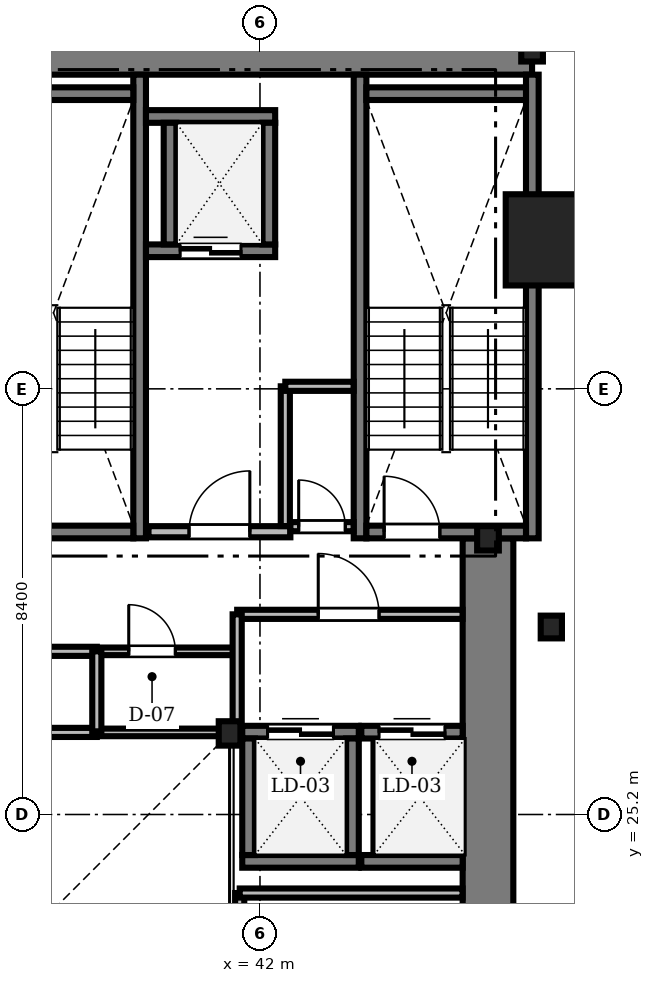
"""IFC4 building model, lengths in metres.
Left out: names, types, materials, properties, quantities, classifications, styles, units other than length and angle.
Written with IfcOpenShell. Run it as: python <this file> out.ifc"""

import sys

from ifc_helpers import new_model, si_unit, direction, frame, frame_2d, origin, origin_2d, place, context, subcontext, project, spatial, rectangle, i_section, extrude, source, transform, mapped, element, fill, save


model = new_model("IFC4")
c1 = context("Model", 3, precision=1e-05, world=origin(), true_north=direction((0.0, 1.0)))
c2 = subcontext(c1, "Body", "Model", "MODEL_VIEW")
j1 = project(units=[si_unit("LENGTHUNIT", "METRE"), si_unit("PLANEANGLEUNIT", "RADIAN")], contexts=[c1])
p1 = place(None, origin())
s1 = spatial("IfcSite", under=j1, at=p1, CompositionType="ELEMENT")
p2 = place(p1, origin())
s2 = spatial("IfcBuilding", under=s1, at=p2, CompositionType="ELEMENT")
p3 = place(p2, frame((0.0, 0.0, 60.45)))
s3 = spatial("IfcBuildingStorey", under=s2, at=p3, CompositionType="ELEMENT", Elevation=60.45)
m1 = source(origin(), c2, "Body", "SweptSolid", [
    extrude(rectangle(XDim=17.52, YDim=1.0, at=frame_2d((8.76, 0.0))), origin(), (0.0, 0.0, 1.0), 3.41),
])
p4 = place(p3, frame((29.85, 40.3, 0.0), z_axis=(0.0, 0.0, 1.0), x_axis=(1.0, 0.0, 0.0)))
e1 = element("IfcWall", 1, at=p4, inside=s3, PredefinedType="SHEAR", context=c2, shape_type="MappedRepresentation", body=[
    mapped(m1, transform((0.0, 0.0, 0.0), scale=1.0)),
])
m2 = source(origin(), c2, "Body", "SweptSolid", [
    extrude(rectangle(XDim=13.15, YDim=1.0, at=frame_2d((6.575, 0.0))), origin(), (0.0, 0.0, 1.0), 3.41),
])
p5 = place(p3, frame((46.5, 17.5, 0.0), z_axis=(0.0, 0.0, 1.0), x_axis=(0.0, 1.0, 0.0)))
e2 = element("IfcWall", 2, at=p5, inside=s3, PredefinedType="SHEAR", context=c2, shape_type="MappedRepresentation", body=[
    mapped(m2, transform((0.0, 0.0, 0.0), scale=1.0)),
])
m3 = source(origin(), c2, "Body", "SweptSolid", [
    extrude(i_section(OverallWidth=0.428, OverallDepth=0.481, WebThickness=0.04, FlangeThickness=0.063, FilletRadius=0.015, at=origin_2d()), origin(), (0.0, 0.0, 1.0), 3.41),
])
for number, where, z_axis, x_axis in (
    (3, (41.4, 26.8, 0.0), (0.0, 0.0, 1.0), (1.0, 0.0, 0.0)),
    (4, (46.5, 30.65, 0.0), (0.0, 0.0, 1.0), (1.0, 0.0, 0.0)),
    (5, (47.37, 40.3, 0.0), (0.0, 0.0, 1.0), (1.0, 0.0, 0.0)),
):
    element("IfcColumn", number, at=place(p3, frame(where, z_axis=z_axis, x_axis=x_axis)), inside=s3, PredefinedType="COLUMN", context=c2, shape_type="MappedRepresentation", body=[
        mapped(m3, transform((0.0, 0.0, 0.0), scale=1.0)),
    ])
m4 = source(origin(), c2, "Body", "SweptSolid", [
    extrude(rectangle(XDim=1.8, YDim=1.8, at=origin_2d()), origin(), (0.0, 0.0, 1.0), 3.41),
])
p6 = place(p3, frame((47.75, 36.54, 0.0), z_axis=(0.0, 0.0, 1.0), x_axis=(1.0, 0.0, 0.0)))
e6 = element("IfcColumn", 6, at=p6, inside=s3, PredefinedType="COLUMN", context=c2, shape_type="MappedRepresentation", body=[
    mapped(m4, transform((0.0, 0.0, 0.0), scale=1.0)),
])
m5 = source(origin(), c2, "Body", "SweptSolid", [
    extrude(i_section(OverallWidth=0.419, OverallDepth=0.449, WebThickness=0.031, FlangeThickness=0.048, FilletRadius=0.015, at=origin_2d()), origin(), (0.0, 0.0, 1.0), 3.41),
])
p7 = place(p3, frame((47.75, 28.9, 0.0), z_axis=(0.0, 0.0, 1.0), x_axis=(1.0, 0.0, 0.0)))
e7 = element("IfcColumn", 7, at=p7, inside=s3, PredefinedType="COLUMN", context=c2, shape_type="MappedRepresentation", body=[
    mapped(m5, transform((0.0, 0.0, 0.0), scale=1.0)),
])
m6 = source(origin(), c2, "Body", "SweptSolid", [
    extrude(rectangle(XDim=9.15, YDim=0.25, at=frame_2d((4.575, 0.0))), origin(), (0.0, 0.0, 1.0), 3.45),
])
p8 = place(p3, frame((39.625, 30.65, 0.0), z_axis=(0.0, 0.0, 1.0), x_axis=(0.0, 1.0, 0.0)))
e8 = element("IfcWall", 8, at=p8, inside=s3, PredefinedType="SOLIDWALL", context=c2, shape_type="MappedRepresentation", body=[
    mapped(m6, transform((0.0, 0.0, 0.0), scale=1.0)),
])
m7 = source(origin(), c2, "Body", "SweptSolid", [
    extrude(rectangle(XDim=3.15, YDim=0.25, at=frame_2d((1.575, 0.0))), origin(), (0.0, 0.0, 1.0), 3.45),
])
p9 = place(p3, frame((36.35, 39.425, 0.0), z_axis=(0.0, 0.0, 1.0), x_axis=(1.0, 0.0, 0.0)))
e9 = element("IfcWall", 9, at=p9, inside=s3, PredefinedType="SOLIDWALL", context=c2, shape_type="MappedRepresentation", body=[
    mapped(m7, transform((0.0, 0.0, 0.0), scale=1.0)),
])
p10 = place(p3, frame((36.35, 30.775, 0.0), z_axis=(0.0, 0.0, 1.0), x_axis=(1.0, 0.0, 0.0)))
e10 = element("IfcWall", 10, at=p10, inside=s3, PredefinedType="SOLIDWALL", context=c2, shape_type="MappedRepresentation", body=[
    mapped(m7, transform((0.0, 0.0, 0.0), scale=1.0)),
])
m8 = source(origin(), c2, "Body", "SweptSolid", [
    extrude(rectangle(XDim=1.1, YDim=2.2, at=frame_2d((0.55, 1.1))), frame((0.0, 0.135, 0.0), z_axis=(0.0, -1.0, 0.0), x_axis=(1.0, 0.0, 0.0)), (0.0, 0.0, 1.0), 0.27),
])
p11 = place(p10, frame((0.35, 0.0, 0.0)))
e11 = element("IfcOpeningElement", 11, at=p11, cuts=e10, PredefinedType="OPENING", context=c2, shape_type="MappedRepresentation", body=[
    mapped(m8, transform((0.0, 0.0, 0.0), scale=1.0)),
])
for number, where, z_axis, x_axis in (
    (12, (43.975, 30.65, 0.0), (0.0, 0.0, 1.0), (0.0, 1.0, 0.0)),
    (13, (47.375, 30.65, 0.0), (0.0, 0.0, 1.0), (0.0, 1.0, 0.0)),
):
    element("IfcWall", number, at=place(p3, frame(where, z_axis=z_axis, x_axis=x_axis)), inside=s3, PredefinedType="SOLIDWALL", context=c2, shape_type="MappedRepresentation", body=[
        mapped(m6, transform((0.0, 0.0, 0.0), scale=1.0)),
    ])
p12 = place(p3, frame((44.1, 39.425, 0.0), z_axis=(0.0, 0.0, 1.0), x_axis=(1.0, 0.0, 0.0)))
e14 = element("IfcWall", 14, at=p12, inside=s3, PredefinedType="SOLIDWALL", context=c2, shape_type="MappedRepresentation", body=[
    mapped(m7, transform((0.0, 0.0, 0.0), scale=1.0)),
])
p13 = place(p3, frame((44.1, 30.775, 0.0), z_axis=(0.0, 0.0, 1.0), x_axis=(1.0, 0.0, 0.0)))
e15 = element("IfcWall", 15, at=p13, inside=s3, PredefinedType="SOLIDWALL", context=c2, shape_type="MappedRepresentation", body=[
    mapped(m7, transform((0.0, 0.0, 0.0), scale=1.0)),
])
p14 = place(p13, frame((0.35, 0.0, 0.0)))
e16 = element("IfcOpeningElement", 16, at=p14, cuts=e15, PredefinedType="OPENING", context=c2, shape_type="MappedRepresentation", body=[
    mapped(m8, transform((0.0, 0.0, 0.0), scale=1.0)),
])
m9 = source(origin(), c2, "Body", "SweptSolid", [
    extrude(rectangle(XDim=2.8, YDim=0.22, at=frame_2d((1.4, 0.0))), origin(), (0.0, 0.0, 1.0), 3.41),
])
p15 = place(p3, frame((39.8, 30.78, 0.0), z_axis=(0.0, 0.0, 1.0), x_axis=(1.0, 0.0, 0.0)))
e17 = element("IfcWall", 17, at=p15, inside=s3, PredefinedType="SOLIDWALL", context=c2, shape_type="MappedRepresentation", body=[
    mapped(m9, transform((0.0, 0.0, 0.0), scale=1.0)),
])
m10 = source(origin(), c2, "Body", "SweptSolid", [
    extrude(rectangle(XDim=1.2, YDim=2.2, at=frame_2d((0.6, 1.1))), frame((0.0, 0.12, 0.0), z_axis=(0.0, -1.0, 0.0), x_axis=(1.0, 0.0, 0.0)), (0.0, 0.0, 1.0), 0.24),
])
p16 = place(p15, frame((0.8, 0.0, 0.0)))
e18 = element("IfcOpeningElement", 18, at=p16, cuts=e17, PredefinedType="OPENING", context=c2, shape_type="MappedRepresentation", body=[
    mapped(m10, transform((0.0, 0.0, 0.0), scale=1.0)),
])
m11 = source(origin(), c2, "Body", "SweptSolid", [
    extrude(rectangle(XDim=2.55, YDim=0.25, at=frame_2d((1.275, 0.0))), origin(), (0.0, 0.0, 1.0), 3.41),
])
p17 = place(p3, frame((39.75, 36.325, 0.0), z_axis=(0.0, 0.0, 1.0), x_axis=(1.0, 0.0, 0.0)))
e19 = element("IfcWall", 19, at=p17, inside=s3, PredefinedType="SOLIDWALL", context=c2, shape_type="MappedRepresentation", body=[
    mapped(m11, transform((0.0, 0.0, 0.0), scale=1.0)),
])
m12 = source(origin(), c2, "Body", "SweptSolid", [
    extrude(rectangle(XDim=1.2, YDim=2.25, at=frame_2d((0.6, 1.125))), frame((0.0, 0.135, 0.0), z_axis=(0.0, -1.0, 0.0), x_axis=(1.0, 0.0, 0.0)), (0.0, 0.0, 1.0), 0.27),
])
p18 = place(p17, frame((0.675, 0.0, 0.0)))
e20 = element("IfcOpeningElement", 20, at=p18, cuts=e19, PredefinedType="OPENING", context=c2, shape_type="MappedRepresentation", body=[
    mapped(m12, transform((0.0, 0.0, 0.0), scale=1.0)),
])
p19 = place(p3, frame((39.75, 38.975, 0.0), z_axis=(0.0, 0.0, 1.0), x_axis=(1.0, 0.0, 0.0)))
e21 = element("IfcWall", 21, at=p19, inside=s3, PredefinedType="SOLIDWALL", context=c2, shape_type="MappedRepresentation", body=[
    mapped(m11, transform((0.0, 0.0, 0.0), scale=1.0)),
])
m13 = source(origin(), c2, "Body", "SweptSolid", [
    extrude(rectangle(XDim=2.4, YDim=0.25, at=frame_2d((1.2, 0.0))), origin(), (0.0, 0.0, 1.0), 3.41),
])
for number, where, z_axis, x_axis in (
    (22, (40.225, 36.45, 0.0), (0.0, 0.0, 1.0), (0.0, 1.0, 0.0)),
    (23, (42.175, 36.45, 0.0), (0.0, 0.0, 1.0), (0.0, 1.0, 0.0)),
):
    element("IfcWall", number, at=place(p3, frame(where, z_axis=z_axis, x_axis=x_axis)), inside=s3, PredefinedType="SOLIDWALL", context=c2, shape_type="MappedRepresentation", body=[
        mapped(m13, transform((0.0, 0.0, 0.0), scale=1.0)),
    ])
m14 = source(origin(), c2, "Body", "SweptSolid", [
    extrude(rectangle(XDim=2.3, YDim=0.25, at=frame_2d((1.15, 0.0))), origin(), (0.0, 0.0, 1.0), 3.41),
])
p20 = place(p3, frame((41.65, 24.275, 0.0), z_axis=(0.0, 0.0, 1.0), x_axis=(1.0, 0.0, 0.0)))
e24 = element("IfcWall", 24, at=p20, inside=s3, PredefinedType="SOLIDWALL", context=c2, shape_type="MappedRepresentation", body=[
    mapped(m14, transform((0.0, 0.0, 0.0), scale=1.0)),
])
p21 = place(p3, frame((41.65, 26.825, 0.0), z_axis=(0.0, 0.0, 1.0), x_axis=(1.0, 0.0, 0.0)))
e25 = element("IfcWall", 25, at=p21, inside=s3, PredefinedType="SOLIDWALL", context=c2, shape_type="MappedRepresentation", body=[
    mapped(m14, transform((0.0, 0.0, 0.0), scale=1.0)),
])
m15 = source(origin(), c2, "Body", "SweptSolid", [
    extrude(rectangle(XDim=1.3, YDim=2.3, at=frame_2d((0.65, 1.15))), frame((0.0, 0.135, 0.0), z_axis=(0.0, -1.0, 0.0), x_axis=(1.0, 0.0, 0.0)), (0.0, 0.0, 1.0), 0.27),
])
p22 = place(p21, frame((0.5, 0.0, 0.0)))
e26 = element("IfcOpeningElement", 26, at=p22, cuts=e25, PredefinedType="OPENING", context=c2, shape_type="MappedRepresentation", body=[
    mapped(m15, transform((0.0, 0.0, 0.0), scale=1.0)),
])
for number, where, z_axis, x_axis in (
    (27, (41.775, 24.4, 0.0), (0.0, 0.0, 1.0), (0.0, 1.0, 0.0)),
    (28, (43.825, 24.4, 0.0), (0.0, 0.0, 1.0), (0.0, 1.0, 0.0)),
):
    element("IfcWall", number, at=place(p3, frame(where, z_axis=z_axis, x_axis=x_axis)), inside=s3, PredefinedType="SOLIDWALL", context=c2, shape_type="MappedRepresentation", body=[
        mapped(m14, transform((0.0, 0.0, 0.0), scale=1.0)),
    ])
m16 = source(origin(), c2, "Body", "SweptSolid", [
    extrude(rectangle(XDim=2.0, YDim=0.25, at=frame_2d((1.0, 0.0))), origin(), (0.0, 0.0, 1.0), 3.41),
])
p23 = place(p3, frame((44.0, 24.275, 0.0), z_axis=(0.0, 0.0, 1.0), x_axis=(1.0, 0.0, 0.0)))
e29 = element("IfcWall", 29, at=p23, inside=s3, PredefinedType="SOLIDWALL", context=c2, shape_type="MappedRepresentation", body=[
    mapped(m16, transform((0.0, 0.0, 0.0), scale=1.0)),
])
p24 = place(p3, frame((44.0, 26.825, 0.0), z_axis=(0.0, 0.0, 1.0), x_axis=(1.0, 0.0, 0.0)))
e30 = element("IfcWall", 30, at=p24, inside=s3, PredefinedType="SOLIDWALL", context=c2, shape_type="MappedRepresentation", body=[
    mapped(m16, transform((0.0, 0.0, 0.0), scale=1.0)),
])
p25 = place(p24, frame((0.35, 0.0, 0.0)))
e31 = element("IfcOpeningElement", 31, at=p25, cuts=e30, PredefinedType="OPENING", context=c2, shape_type="MappedRepresentation", body=[
    mapped(m15, transform((0.0, 0.0, 0.0), scale=1.0)),
])
m17 = source(origin(), c2, "Body", "SweptSolid", [
    extrude(rectangle(XDim=7.33, YDim=0.18, at=frame_2d((3.665, 0.0))), origin(), (0.0, 0.0, 1.0), 3.042),
])
p26 = place(p3, frame((31.45, 28.42, 0.0), z_axis=(0.0, 0.0, 1.0), x_axis=(1.0, 0.0, 0.0)))
e32 = element("IfcWall", 32, at=p26, inside=s3, PredefinedType="PARTITIONING", context=c2, shape_type="MappedRepresentation", body=[
    mapped(m17, transform((0.0, 0.0, 0.0), scale=1.0)),
])
m18 = source(origin(), c2, "Body", "SweptSolid", [
    extrude(rectangle(XDim=0.95, YDim=2.15, at=frame_2d((0.475, 1.075))), frame((0.0, 0.1, 0.0), z_axis=(0.0, -1.0, 0.0), x_axis=(1.0, 0.0, 0.0)), (0.0, 0.0, 1.0), 0.2),
])
p27 = place(p26, frame((0.65, 0.0, 0.0)))
e33 = element("IfcOpeningElement", 33, at=p27, cuts=e32, PredefinedType="OPENING", context=c2, shape_type="MappedRepresentation", body=[
    mapped(m18, transform((0.0, 0.0, 0.0), scale=1.0)),
])
m19 = source(origin(), c2, "Body", "SweptSolid", [
    extrude(rectangle(XDim=4.448, YDim=0.18, at=frame_2d((2.224, 0.0))), origin(), (0.0, 0.0, 1.0), 3.042),
])
p28 = place(p3, frame((41.55, 29.15, 0.0), z_axis=(0.0, 0.0, 1.0), x_axis=(1.0, 0.0, 0.0)))
e34 = element("IfcWall", 34, at=p28, inside=s3, PredefinedType="PARTITIONING", context=c2, shape_type="MappedRepresentation", body=[
    mapped(m19, transform((0.0, 0.0, 0.0), scale=1.0)),
])
m20 = source(origin(), c2, "Body", "SweptSolid", [
    extrude(rectangle(XDim=1.2, YDim=2.2, at=frame_2d((0.6, 1.1))), frame((0.0, 0.1, 0.0), z_axis=(0.0, -1.0, 0.0), x_axis=(1.0, 0.0, 0.0)), (0.0, 0.0, 1.0), 0.2),
])
p29 = place(p28, frame((1.6, 0.0, 0.0)))
e35 = element("IfcOpeningElement", 35, at=p29, cuts=e34, PredefinedType="OPENING", context=c2, shape_type="MappedRepresentation", body=[
    mapped(m20, transform((0.0, 0.0, 0.0), scale=1.0)),
])
m21 = source(origin(), c2, "Body", "SweptSolid", [
    extrude(rectangle(XDim=2.74, YDim=0.15, at=frame_2d((1.37, 0.0))), origin(), (0.0, 0.0, 1.0), 3.41),
])
p30 = place(p3, frame((38.78, 28.42, 0.0), z_axis=(0.0, 0.0, 1.0), x_axis=(1.0, 0.0, 0.0)))
e36 = element("IfcWall", 36, at=p30, inside=s3, PredefinedType="PARTITIONING", context=c2, shape_type="MappedRepresentation", body=[
    mapped(m21, transform((0.0, 0.0, 0.0), scale=1.0)),
])
m22 = source(origin(), c2, "Body", "SweptSolid", [
    extrude(rectangle(XDim=0.92, YDim=2.1, at=frame_2d((0.46, 1.05))), frame((0.0, 0.085, 0.0), z_axis=(0.0, -1.0, 0.0), x_axis=(1.0, 0.0, 0.0)), (0.0, 0.0, 1.0), 0.17),
])
p31 = place(p30, frame((0.63, 0.0, 0.0)))
e37 = element("IfcOpeningElement", 37, at=p31, cuts=e36, PredefinedType="OPENING", context=c2, shape_type="MappedRepresentation", body=[
    mapped(m22, transform((0.0, 0.0, 0.0), scale=1.0)),
])
m23 = source(origin(), c2, "Body", "SweptSolid", [
    extrude(rectangle(XDim=1.248, YDim=0.18, at=frame_2d((0.624, 0.0))), origin(), (0.0, 0.0, 1.0), 3.41),
])
p32 = place(p3, frame((42.6, 30.88, 0.0), z_axis=(0.0, 0.0, 1.0), x_axis=(1.0, 0.0, 0.0)))
e38 = element("IfcWall", 38, at=p32, inside=s3, PredefinedType="PARTITIONING", context=c2, shape_type="MappedRepresentation", body=[
    mapped(m23, transform((0.0, 0.0, 0.0), scale=1.0)),
])
m24 = source(origin(), c2, "Body", "SweptSolid", [
    extrude(rectangle(XDim=0.92, YDim=2.1, at=frame_2d((0.46, 1.05))), frame((0.0, 0.1, 0.0), z_axis=(0.0, -1.0, 0.0), x_axis=(1.0, 0.0, 0.0)), (0.0, 0.0, 1.0), 0.2),
])
p33 = place(p32, frame((0.164, 0.0, 0.0)))
e39 = element("IfcOpeningElement", 39, at=p33, cuts=e38, PredefinedType="OPENING", context=c2, shape_type="MappedRepresentation", body=[
    mapped(m24, transform((0.0, 0.0, 0.0), scale=1.0)),
])
m25 = source(origin(), c2, "Body", "SweptSolid", [
    extrude(rectangle(XDim=7.33, YDim=0.18, at=frame_2d((3.665, 0.0))), origin(), (0.0, 0.0, 1.0), 2.952),
])
p34 = place(p3, frame((31.45, 26.82, 0.0), z_axis=(0.0, 0.0, 1.0), x_axis=(1.0, 0.0, 0.0)))
e40 = element("IfcWall", 40, at=p34, inside=s3, PredefinedType="PARTITIONING", context=c2, shape_type="MappedRepresentation", body=[
    mapped(m25, transform((0.0, 0.0, 0.0), scale=1.0)),
])
m26 = source(origin(), c2, "Body", "SweptSolid", [
    extrude(rectangle(XDim=7.15, YDim=0.18, at=frame_2d((3.575, 0.0))), origin(), (0.0, 0.0, 1.0), 2.802),
])
p35 = place(p3, frame((41.6, 16.5, 0.0), z_axis=(0.0, 0.0, 1.0), x_axis=(0.0, 1.0, 0.0)))
e41 = element("IfcWall", 41, at=p35, inside=s3, PredefinedType="PARTITIONING", context=c2, shape_type="MappedRepresentation", body=[
    mapped(m26, transform((0.0, 0.0, 0.0), scale=1.0)),
])
m27 = source(origin(), c2, "Body", "SweptSolid", [
    extrude(rectangle(XDim=4.398, YDim=0.18, at=frame_2d((2.199, 0.0))), origin(), (0.0, 0.0, 1.0), 3.41),
])
p36 = place(p3, frame((41.6, 23.65, 0.0), z_axis=(0.0, 0.0, 1.0), x_axis=(1.0, 0.0, 0.0)))
e42 = element("IfcWall", 42, at=p36, inside=s3, PredefinedType="PARTITIONING", context=c2, shape_type="MappedRepresentation", body=[
    mapped(m27, transform((0.0, 0.0, 0.0), scale=1.0)),
])
m28 = source(origin(), c2, "Body", "SweptSolid", [
    extrude(rectangle(XDim=2.758, YDim=0.18, at=frame_2d((1.379, 0.0))), origin(), (0.0, 0.0, 1.0), 3.41),
])
p37 = place(p3, frame((42.5, 30.892, 0.0), z_axis=(0.0, 0.0, 1.0), x_axis=(0.0, 1.0, 0.0)))
e43 = element("IfcWall", 43, at=p37, inside=s3, PredefinedType="PARTITIONING", context=c2, shape_type="MappedRepresentation", body=[
    mapped(m28, transform((0.0, 0.0, 0.0), scale=1.0)),
])
m29 = source(origin(), c2, "Body", "SweptSolid", [
    extrude(rectangle(XDim=2.74, YDim=0.15, at=frame_2d((1.37, 0.0))), origin(), (0.0, 0.0, 1.0), 2.802),
])
p38 = place(p3, frame((38.78, 26.82, 0.0), z_axis=(0.0, 0.0, 1.0), x_axis=(1.0, 0.0, 0.0)))
e44 = element("IfcWall", 44, at=p38, inside=s3, PredefinedType="PARTITIONING", context=c2, shape_type="MappedRepresentation", body=[
    mapped(m29, transform((0.0, 0.0, 0.0), scale=1.0)),
])
m30 = source(origin(), c2, "Body", "SweptSolid", [
    extrude(rectangle(XDim=2.35, YDim=0.18, at=frame_2d((1.175, 0.0))), origin(), (0.0, 0.0, 1.0), 2.802),
])
p39 = place(p3, frame((41.55, 26.8, 0.0), z_axis=(0.0, 0.0, 1.0), x_axis=(0.0, 1.0, 0.0)))
e45 = element("IfcWall", 45, at=p39, inside=s3, PredefinedType="PARTITIONING", context=c2, shape_type="MappedRepresentation", body=[
    mapped(m30, transform((0.0, 0.0, 0.0), scale=1.0)),
])
m31 = source(origin(), c2, "Body", "SweptSolid", [
    extrude(rectangle(XDim=1.6, YDim=0.18, at=frame_2d((0.8, 0.0))), origin(), (0.0, 0.0, 1.0), 2.952),
])
p40 = place(p3, frame((38.78, 26.82, 0.0), z_axis=(0.0, 0.0, 1.0), x_axis=(0.0, 1.0, 0.0)))
e46 = element("IfcWall", 46, at=p40, inside=s3, PredefinedType="PARTITIONING", context=c2, shape_type="MappedRepresentation", body=[
    mapped(m31, transform((0.0, 0.0, 0.0), scale=1.0)),
])
m32 = source(origin(), c2, "Body", "SweptSolid", [
    extrude(rectangle(XDim=1.348, YDim=0.18, at=frame_2d((0.674, 0.0))), origin(), (0.0, 0.0, 1.0), 3.41),
])
p41 = place(p3, frame((42.5, 33.65, 0.0), z_axis=(0.0, 0.0, 1.0), x_axis=(1.0, 0.0, 0.0)))
e47 = element("IfcWall", 47, at=p41, inside=s3, PredefinedType="PARTITIONING", context=c2, shape_type="MappedRepresentation", body=[
    mapped(m32, transform((0.0, 0.0, 0.0), scale=1.0)),
])
m33 = source(origin(), c2, "Body", "SweptSolid", [
    extrude(rectangle(XDim=1.1, YDim=2.2, at=frame_2d((0.55, 1.1))), frame((0.0, 0.025, 0.0), z_axis=(0.0, -1.0, 0.0), x_axis=(1.0, 0.0, 0.0)), (0.0, 0.0, 1.0), 0.05),
])
p42 = place(p14, origin())
e48 = element("IfcDoor", 48, at=p42, inside=s3, OperationType="SINGLE_SWING_LEFT", PredefinedType="DOOR", context=c2, shape_type="MappedRepresentation", body=[
    mapped(m33, transform((0.0, 0.0, 0.0), scale=1.0)),
])
fill(e16, e48)
m34 = source(origin(), c2, "Body", "SweptSolid", [
    extrude(rectangle(XDim=1.2, YDim=2.2, at=frame_2d((0.6, 1.1))), frame((0.0, 0.025, 0.0), z_axis=(0.0, -1.0, 0.0), x_axis=(1.0, 0.0, 0.0)), (0.0, 0.0, 1.0), 0.05),
])
p43 = place(p16, origin())
e49 = element("IfcDoor", 49, at=p43, inside=s3, OperationType="SINGLE_SWING_RIGHT", PredefinedType="DOOR", context=c2, shape_type="MappedRepresentation", body=[
    mapped(m34, transform((0.0, 0.0, 0.0), scale=1.0)),
])
fill(e18, e49)
m35 = source(origin(), c2, "Body", "SweptSolid", [
    extrude(rectangle(XDim=1.2, YDim=2.25, at=frame_2d((0.6, 1.125))), frame((0.0, 0.025, 0.0), z_axis=(0.0, -1.0, 0.0), x_axis=(1.0, 0.0, 0.0)), (0.0, 0.0, 1.0), 0.05),
])
p44 = place(p18, origin())
e50 = element("IfcDoor", 50, at=p44, inside=s3, OperationType="DOUBLE_DOOR_SLIDING", PredefinedType="DOOR", context=c2, shape_type="MappedRepresentation", body=[
    mapped(m35, transform((0.0, 0.0, 0.0), scale=1.0)),
])
fill(e20, e50)
m36 = source(origin(), c2, "Body", "SweptSolid", [
    extrude(rectangle(XDim=1.3, YDim=2.3, at=frame_2d((0.65, 1.15))), frame((0.0, 0.025, 0.0), z_axis=(0.0, -1.0, 0.0), x_axis=(1.0, 0.0, 0.0)), (0.0, 0.0, 1.0), 0.05),
])
p45 = place(p22, origin())
e51 = element("IfcDoor", 51, at=p45, inside=s3, OperationType="DOUBLE_DOOR_SLIDING", PredefinedType="DOOR", context=c2, shape_type="MappedRepresentation", body=[
    mapped(m36, transform((0.0, 0.0, 0.0), scale=1.0)),
])
fill(e26, e51)
p46 = place(p25, origin())
e52 = element("IfcDoor", 52, at=p46, inside=s3, OperationType="DOUBLE_DOOR_SLIDING", PredefinedType="DOOR", context=c2, shape_type="MappedRepresentation", body=[
    mapped(m36, transform((0.0, 0.0, 0.0), scale=1.0)),
])
fill(e31, e52)
p47 = place(p29, origin())
e53 = element("IfcDoor", 53, at=p47, inside=s3, OperationType="SINGLE_SWING_LEFT", PredefinedType="DOOR", context=c2, shape_type="MappedRepresentation", body=[
    mapped(m34, transform((0.0, 0.0, 0.0), scale=1.0)),
])
fill(e35, e53)
m37 = source(origin(), c2, "Body", "SweptSolid", [
    extrude(rectangle(XDim=0.92, YDim=2.1, at=frame_2d((0.46, 1.05))), frame((0.0, 0.025, 0.0), z_axis=(0.0, -1.0, 0.0), x_axis=(1.0, 0.0, 0.0)), (0.0, 0.0, 1.0), 0.05),
])
p48 = place(p31, origin())
e54 = element("IfcDoor", 54, at=p48, inside=s3, OperationType="SINGLE_SWING_LEFT", PredefinedType="DOOR", context=c2, shape_type="MappedRepresentation", body=[
    mapped(m37, transform((0.0, 0.0, 0.0), scale=1.0)),
])
fill(e37, e54)
p49 = place(p33, origin())
e55 = element("IfcDoor", 55, at=p49, inside=s3, OperationType="SINGLE_SWING_LEFT", PredefinedType="DOOR", context=c2, shape_type="MappedRepresentation", body=[
    mapped(m37, transform((0.0, 0.0, 0.0), scale=1.0)),
])
fill(e39, e55)
save(model, sys.argv[1])
